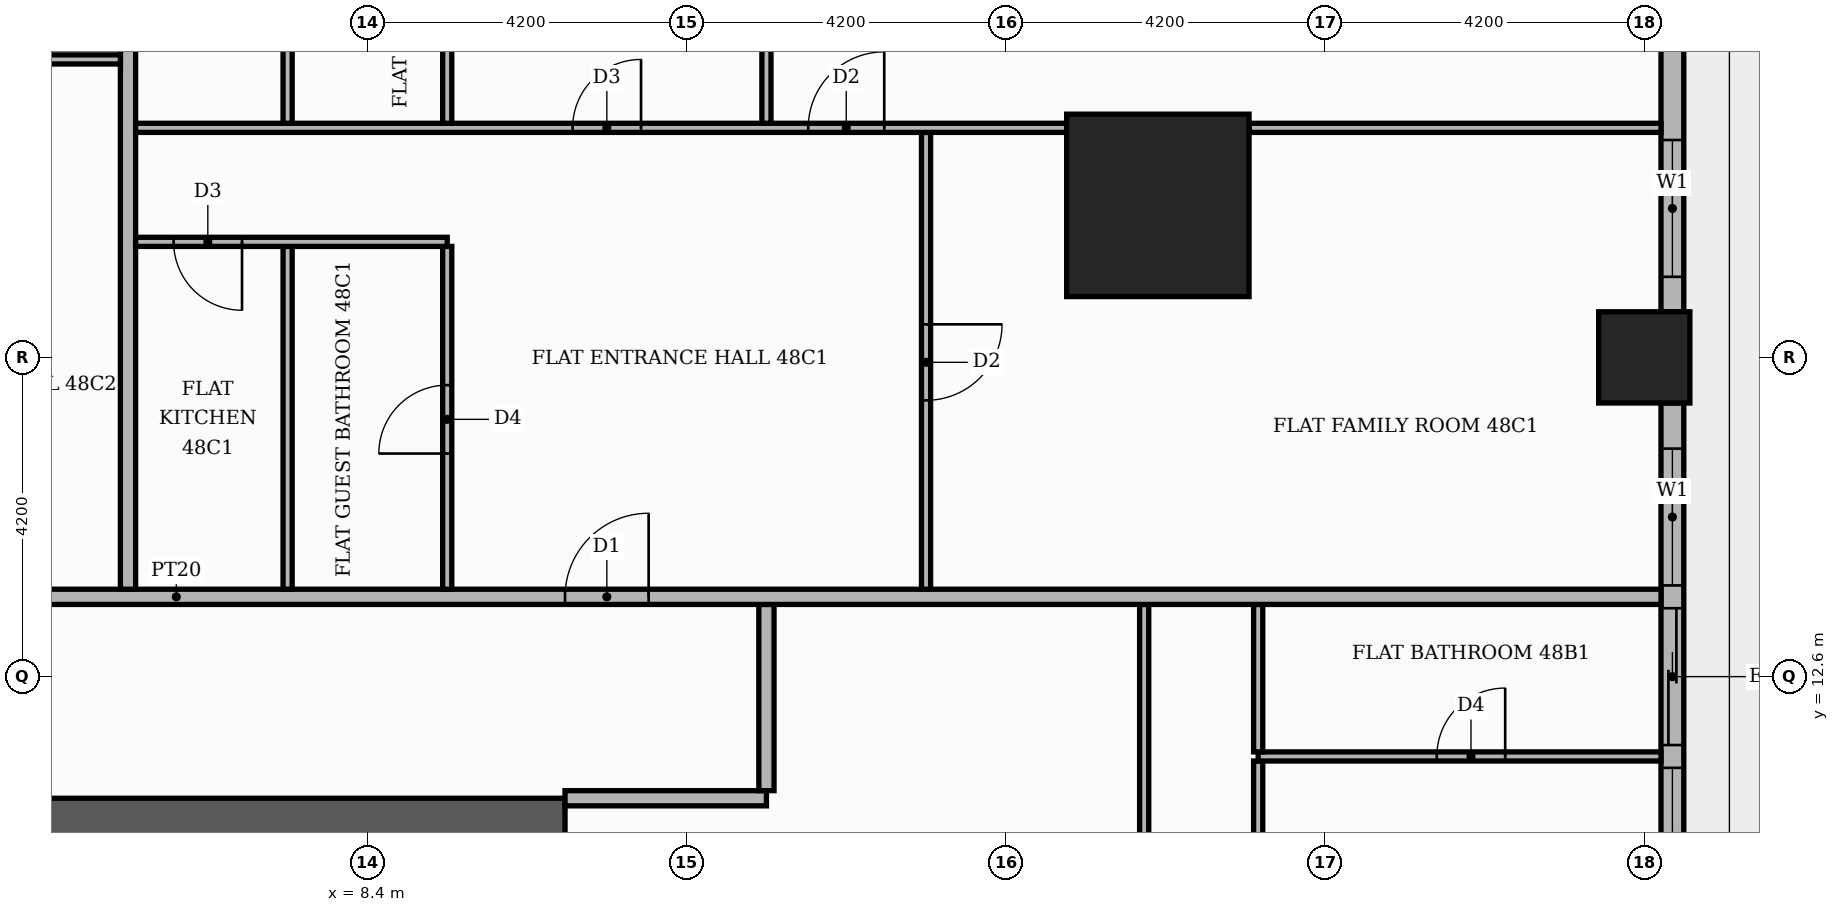
"""IFC4 building model, lengths in metres.
Left out: names, types, materials, properties, quantities, classifications, styles, units other than length and angle.
Written with IfcOpenShell. Run it as: python <this file> out.ifc"""

import sys

from ifc_helpers import new_model, si_unit, direction, frame, frame_2d, origin, origin_2d, place, context, subcontext, project, spatial, rectangle, extrude, element, fill, save


model = new_model("IFC4")
c1 = context("Model", 3, precision=1e-05, world=origin(), true_north=direction((0.0, 1.0)))
c2 = subcontext(c1, "Body", "Model", "MODEL_VIEW")
j1 = project(units=[si_unit("LENGTHUNIT", "METRE"), si_unit("PLANEANGLEUNIT", "RADIAN")], contexts=[c1])
p1 = place(None, origin())
s1 = spatial("IfcSite", under=j1, at=p1, CompositionType="ELEMENT")
p2 = place(p1, origin())
s2 = spatial("IfcBuilding", under=s1, at=p2, CompositionType="ELEMENT")
p3 = place(p2, frame((0.0, 0.0, 204.0)))
s3 = spatial("IfcBuildingStorey", under=s2, at=p3, CompositionType="ELEMENT", Elevation=204.0)
p4 = place(p3, frame((-11.0, 10.55, 0.0), z_axis=(0.0, 0.0, 1.0), x_axis=(1.0, 0.0, 0.0)))
e1 = element("IfcWall", 1, at=p4, inside=s3, PredefinedType="SHEAR", context=c2, shape_type="SweptSolid", body=[
    extrude(rectangle(XDim=22.0, YDim=0.9, at=frame_2d((11.0, 0.0))), origin(), (0.0, 0.0, 1.0), 3.48),
])
p5 = place(p4, frame((13.3, 0.0, 0.0)))
e2 = element("IfcOpeningElement", 2, at=p5, cuts=e1, PredefinedType="OPENING", context=c2, shape_type="SweptSolid", body=[
    extrude(rectangle(XDim=1.8, YDim=2.2, at=frame_2d((0.9, 1.1))), frame((0.0, 0.46, 0.0), z_axis=(0.0, -1.0, 0.0), x_axis=(1.0, 0.0, 0.0)), (0.0, 0.0, 1.0), 0.92),
])
p6 = place(p3, frame((18.8, 18.8, 0.0), z_axis=(0.0, 0.0, 1.0), x_axis=(1.0, 0.0, 0.0)))
e3 = element("IfcColumn", 3, at=p6, inside=s3, PredefinedType="COLUMN", context=c2, shape_type="SweptSolid", body=[
    extrude(rectangle(XDim=2.4, YDim=2.4, at=origin_2d()), origin(), (0.0, 0.0, 1.0), 3.9),
])
p7 = place(p3, frame((25.2, 16.8, 0.0), z_axis=(0.0, 0.0, 1.0), x_axis=(1.0, 0.0, 0.0)))
e4 = element("IfcColumn", 4, at=p7, inside=s3, PredefinedType="COLUMN", context=c2, shape_type="SweptSolid", body=[
    extrude(rectangle(XDim=1.2, YDim=1.2, at=origin_2d()), origin(), (0.0, 0.0, 1.0), 3.9),
])
p8 = place(p3, frame((25.57, 9.0, 0.0), z_axis=(0.0, 0.0, 1.0), x_axis=(0.0, 1.0, 0.0)))
e5 = element("IfcWall", 5, at=p8, inside=s3, PredefinedType="STANDARD", context=c2, shape_type="SweptSolid", body=[
    extrude(rectangle(XDim=7.2, YDim=0.3, at=frame_2d((3.6, 0.0))), origin(), (0.0, 0.0, 1.0), 3.48),
])
p9 = place(p8, frame((0.6, 0.0, 0.9)))
e6 = element("IfcOpeningElement", 6, at=p9, cuts=e5, PredefinedType="OPENING", context=c2, shape_type="SweptSolid", body=[
    extrude(rectangle(XDim=1.8, YDim=2.1, at=frame_2d((0.9, 1.05))), frame((0.0, 0.16, 0.0), z_axis=(0.0, -1.0, 0.0), x_axis=(1.0, 0.0, 0.0)), (0.0, 0.0, 1.0), 0.32),
])
p10 = place(p8, frame((2.7, 0.0, 0.0)))
e7 = element("IfcOpeningElement", 7, at=p10, cuts=e5, PredefinedType="OPENING", context=c2, shape_type="SweptSolid", body=[
    extrude(rectangle(XDim=1.8, YDim=2.4, at=frame_2d((0.9, 1.2))), frame((0.0, 0.16, 0.0), z_axis=(0.0, -1.0, 0.0), x_axis=(1.0, 0.0, 0.0)), (0.0, 0.0, 1.0), 0.32),
])
p11 = place(p8, frame((4.8, 0.0, 0.9)))
e8 = element("IfcOpeningElement", 8, at=p11, cuts=e5, PredefinedType="OPENING", context=c2, shape_type="SweptSolid", body=[
    extrude(rectangle(XDim=1.8, YDim=2.1, at=frame_2d((0.9, 1.05))), frame((0.0, 0.16, 0.0), z_axis=(0.0, -1.0, 0.0), x_axis=(1.0, 0.0, 0.0)), (0.0, 0.0, 1.0), 0.32),
])
p12 = place(p3, frame((25.57, 17.4, 0.0), z_axis=(0.0, 0.0, 1.0), x_axis=(0.0, 1.0, 0.0)))
e9 = element("IfcWall", 9, at=p12, inside=s3, PredefinedType="STANDARD", context=c2, shape_type="SweptSolid", body=[
    extrude(rectangle(XDim=3.82, YDim=0.3, at=frame_2d((1.91, 0.0))), origin(), (0.0, 0.0, 1.0), 3.48),
])
p13 = place(p12, frame((0.46, 0.0, 0.9)))
e10 = element("IfcOpeningElement", 10, at=p13, cuts=e9, PredefinedType="OPENING", context=c2, shape_type="SweptSolid", body=[
    extrude(rectangle(XDim=1.8, YDim=2.1, at=frame_2d((0.9, 1.05))), frame((0.0, 0.16, 0.0), z_axis=(0.0, -1.0, 0.0), x_axis=(1.0, 0.0, 0.0)), (0.0, 0.0, 1.0), 0.32),
])
p14 = place(p3, frame((18.62, 5.46, 0.0), z_axis=(0.0, 0.0, 1.0), x_axis=(0.0, 1.0, 0.0)))
e11 = element("IfcWall", 11, at=p14, inside=s3, PredefinedType="PARTITIONING", context=c2, shape_type="SweptSolid", body=[
    extrude(rectangle(XDim=8.09, YDim=0.12, at=frame_2d((4.045, 0.0))), origin(), (0.0, 0.0, 1.0), 3.48),
])
p15 = place(p14, frame((3.615, 0.0, 0.0)))
e12 = element("IfcOpeningElement", 12, at=p15, cuts=e11, PredefinedType="OPENING", context=c2, shape_type="SweptSolid", body=[
    extrude(rectangle(XDim=0.9, YDim=2.1, at=frame_2d((0.45, 1.05))), frame((0.0, 0.07, 0.0), z_axis=(0.0, -1.0, 0.0), x_axis=(1.0, 0.0, 0.0)), (0.0, 0.0, 1.0), 0.14),
])
p16 = place(p3, frame((20.12, 7.41, 0.0), z_axis=(0.0, 0.0, 1.0), x_axis=(0.0, 1.0, 0.0)))
e13 = element("IfcWall", 13, at=p16, inside=s3, PredefinedType="PARTITIONING", context=c2, shape_type="SweptSolid", body=[
    extrude(rectangle(XDim=4.08, YDim=0.12, at=frame_2d((2.04, 0.0))), origin(), (0.0, 0.0, 1.0), 3.48),
])
p17 = place(p16, frame((1.59, 0.0, 0.0)))
e14 = element("IfcOpeningElement", 14, at=p17, cuts=e13, PredefinedType="OPENING", context=c2, shape_type="SweptSolid", body=[
    extrude(rectangle(XDim=0.9, YDim=2.1, at=frame_2d((0.45, 1.05))), frame((0.0, 0.07, 0.0), z_axis=(0.0, -1.0, 0.0), x_axis=(1.0, 0.0, 0.0)), (0.0, 0.0, 1.0), 0.14),
])
p18 = place(p3, frame((11.0, 11.0, 0.0), z_axis=(0.0, 0.0, 1.0), x_axis=(1.0, 0.0, 0.0)))
e15 = element("IfcWall", 15, at=p18, inside=s3, PredefinedType="PARTITIONING", context=c2, shape_type="SweptSolid", body=[
    extrude(rectangle(XDim=2.65, YDim=0.2, at=frame_2d((1.325, 0.0))), origin(), (0.0, 0.0, 1.0), 3.48),
])
p19 = place(p3, frame((13.65, 11.1, 0.0), z_axis=(0.0, 0.0, 1.0), x_axis=(0.0, 1.0, 0.0)))
e16 = element("IfcWall", 16, at=p19, inside=s3, PredefinedType="PARTITIONING", context=c2, shape_type="SweptSolid", body=[
    extrude(rectangle(XDim=2.45, YDim=0.2, at=frame_2d((1.225, 0.0))), origin(), (0.0, 0.0, 1.0), 3.48),
])
p20 = place(p3, frame((20.12, 11.55, 0.0), z_axis=(0.0, 0.0, 1.0), x_axis=(1.0, 0.0, 0.0)))
e17 = element("IfcWall", 17, at=p20, inside=s3, PredefinedType="PARTITIONING", context=c2, shape_type="SweptSolid", body=[
    extrude(rectangle(XDim=5.3, YDim=0.12, at=frame_2d((2.65, 0.0))), origin(), (0.0, 0.0, 1.0), 3.48),
])
p21 = place(p20, frame((2.35, 0.0, 0.0)))
e18 = element("IfcOpeningElement", 18, at=p21, cuts=e17, PredefinedType="OPENING", context=c2, shape_type="SweptSolid", body=[
    extrude(rectangle(XDim=0.9, YDim=2.1, at=frame_2d((0.45, 1.05))), frame((0.0, 0.07, 0.0), z_axis=(0.0, -1.0, 0.0), x_axis=(1.0, 0.0, 0.0)), (0.0, 0.0, 1.0), 0.14),
])
p22 = place(p3, frame((20.12, 11.61, 0.0), z_axis=(0.0, 0.0, 1.0), x_axis=(0.0, 1.0, 0.0)))
e19 = element("IfcWall", 19, at=p22, inside=s3, PredefinedType="PARTITIONING", context=c2, shape_type="SweptSolid", body=[
    extrude(rectangle(XDim=1.94, YDim=0.12, at=frame_2d((0.97, 0.0))), origin(), (0.0, 0.0, 1.0), 3.48),
])
p23 = place(p3, frame((-13.65, 13.65, 0.0), z_axis=(0.0, 0.0, 1.0), x_axis=(1.0, 0.0, 0.0)))
e20 = element("IfcWall", 20, at=p23, inside=s3, PredefinedType="PARTITIONING", context=c2, shape_type="SweptSolid", body=[
    extrude(rectangle(XDim=39.07, YDim=0.2, at=frame_2d((19.535, 0.0))), origin(), (0.0, 0.0, 1.0), 3.48),
])
p24 = place(p23, frame((24.65, 0.0, 0.0)))
e21 = element("IfcOpeningElement", 21, at=p24, cuts=e20, PredefinedType="OPENING", context=c2, shape_type="SweptSolid", body=[
    extrude(rectangle(XDim=1.1, YDim=2.4, at=frame_2d((0.55, 1.2))), frame((0.0, 0.11, 0.0), z_axis=(0.0, -1.0, 0.0), x_axis=(1.0, 0.0, 0.0)), (0.0, 0.0, 1.0), 0.22),
])
p25 = place(p23, frame((16.25, 0.0, 0.0)))
e22 = element("IfcOpeningElement", 22, at=p25, cuts=e20, PredefinedType="OPENING", context=c2, shape_type="SweptSolid", body=[
    extrude(rectangle(XDim=1.1, YDim=2.4, at=frame_2d((0.55, 1.2))), frame((0.0, 0.11, 0.0), z_axis=(0.0, -1.0, 0.0), x_axis=(1.0, 0.0, 0.0)), (0.0, 0.0, 1.0), 0.22),
])
p26 = place(p3, frame((5.25, 13.75, 0.0), z_axis=(0.0, 0.0, 1.0), x_axis=(0.0, 1.0, 0.0)))
e23 = element("IfcWall", 23, at=p26, inside=s3, PredefinedType="PARTITIONING", context=c2, shape_type="SweptSolid", body=[
    extrude(rectangle(XDim=11.67, YDim=0.2, at=frame_2d((5.835, 0.0))), origin(), (0.0, 0.0, 1.0), 3.48),
])
p27 = place(p3, frame((7.35, 13.75, 0.0), z_axis=(0.0, 0.0, 1.0), x_axis=(0.0, 1.0, 0.0)))
e24 = element("IfcWall", 24, at=p27, inside=s3, PredefinedType="PARTITIONING", context=c2, shape_type="SweptSolid", body=[
    extrude(rectangle(XDim=4.51, YDim=0.12, at=frame_2d((2.255, 0.0))), origin(), (0.0, 0.0, 1.0), 3.48),
])
p28 = place(p3, frame((9.45, 13.75, 0.0), z_axis=(0.0, 0.0, 1.0), x_axis=(0.0, 1.0, 0.0)))
e25 = element("IfcWall", 25, at=p28, inside=s3, PredefinedType="PARTITIONING", context=c2, shape_type="SweptSolid", body=[
    extrude(rectangle(XDim=4.51, YDim=0.12, at=frame_2d((2.255, 0.0))), origin(), (0.0, 0.0, 1.0), 3.48),
])
p29 = place(p28, frame((1.785, 0.0, 0.0)))
e26 = element("IfcOpeningElement", 26, at=p29, cuts=e25, PredefinedType="OPENING", context=c2, shape_type="SweptSolid", body=[
    extrude(rectangle(XDim=0.9, YDim=2.1, at=frame_2d((0.45, 1.05))), frame((0.0, 0.07, 0.0), z_axis=(0.0, -1.0, 0.0), x_axis=(1.0, 0.0, 0.0)), (0.0, 0.0, 1.0), 0.14),
])
p30 = place(p3, frame((15.75, 13.75, 0.0), z_axis=(0.0, 0.0, 1.0), x_axis=(0.0, 1.0, 0.0)))
e27 = element("IfcWall", 27, at=p30, inside=s3, PredefinedType="PARTITIONING", context=c2, shape_type="SweptSolid", body=[
    extrude(rectangle(XDim=6.01, YDim=0.12, at=frame_2d((3.005, 0.0))), origin(), (0.0, 0.0, 1.0), 3.48),
])
p31 = place(p30, frame((2.485, 0.0, 0.0)))
e28 = element("IfcOpeningElement", 28, at=p31, cuts=e27, PredefinedType="OPENING", context=c2, shape_type="SweptSolid", body=[
    extrude(rectangle(XDim=1.0, YDim=2.1, at=frame_2d((0.5, 1.05))), frame((0.0, 0.07, 0.0), z_axis=(0.0, -1.0, 0.0), x_axis=(1.0, 0.0, 0.0)), (0.0, 0.0, 1.0), 0.14),
])
p32 = place(p3, frame((5.35, 18.32, 0.0), z_axis=(0.0, 0.0, 1.0), x_axis=(1.0, 0.0, 0.0)))
e29 = element("IfcWall", 29, at=p32, inside=s3, PredefinedType="PARTITIONING", context=c2, shape_type="SweptSolid", body=[
    extrude(rectangle(XDim=4.1, YDim=0.12, at=frame_2d((2.05, 0.0))), origin(), (0.0, 0.0, 1.0), 3.48),
])
p33 = place(p32, frame((0.5, 0.0, 0.0)))
e30 = element("IfcOpeningElement", 30, at=p33, cuts=e29, PredefinedType="OPENING", context=c2, shape_type="SweptSolid", body=[
    extrude(rectangle(XDim=0.9, YDim=2.1, at=frame_2d((0.45, 1.05))), frame((0.0, 0.07, 0.0), z_axis=(0.0, -1.0, 0.0), x_axis=(1.0, 0.0, 0.0)), (0.0, 0.0, 1.0), 0.14),
])
p34 = place(p3, frame((5.35, 19.82, 0.0), z_axis=(0.0, 0.0, 1.0), x_axis=(1.0, 0.0, 0.0)))
e31 = element("IfcWall", 31, at=p34, inside=s3, PredefinedType="PARTITIONING", context=c2, shape_type="SweptSolid", body=[
    extrude(rectangle(XDim=12.25, YDim=0.12, at=frame_2d((6.125, 0.0))), origin(), (0.0, 0.0, 1.0), 3.48),
])
p35 = place(p34, frame((8.85, 0.0, 0.0)))
e32 = element("IfcOpeningElement", 32, at=p35, cuts=e31, PredefinedType="OPENING", context=c2, shape_type="SweptSolid", body=[
    extrude(rectangle(XDim=1.0, YDim=2.1, at=frame_2d((0.5, 1.05))), frame((0.0, 0.07, 0.0), z_axis=(0.0, -1.0, 0.0), x_axis=(1.0, 0.0, 0.0)), (0.0, 0.0, 1.0), 0.14),
])
p36 = place(p34, frame((5.75, 0.0, 0.0)))
e33 = element("IfcOpeningElement", 33, at=p36, cuts=e31, PredefinedType="OPENING", context=c2, shape_type="SweptSolid", body=[
    extrude(rectangle(XDim=0.9, YDim=2.1, at=frame_2d((0.45, 1.05))), frame((0.0, 0.07, 0.0), z_axis=(0.0, -1.0, 0.0), x_axis=(1.0, 0.0, 0.0)), (0.0, 0.0, 1.0), 0.14),
])
p37 = place(p3, frame((20.0, 19.82, 0.0), z_axis=(0.0, 0.0, 1.0), x_axis=(1.0, 0.0, 0.0)))
e34 = element("IfcWall", 34, at=p37, inside=s3, PredefinedType="PARTITIONING", context=c2, shape_type="SweptSolid", body=[
    extrude(rectangle(XDim=5.42, YDim=0.12, at=frame_2d((2.71, 0.0))), origin(), (0.0, 0.0, 1.0), 3.48),
])
p38 = place(p3, frame((7.35, 19.88, 0.0), z_axis=(0.0, 0.0, 1.0), x_axis=(0.0, 1.0, 0.0)))
e35 = element("IfcWall", 35, at=p38, inside=s3, PredefinedType="PARTITIONING", context=c2, shape_type="SweptSolid", body=[
    extrude(rectangle(XDim=5.54, YDim=0.12, at=frame_2d((2.77, 0.0))), origin(), (0.0, 0.0, 1.0), 3.48),
])
p39 = place(p38, frame((2.44, 0.0, 0.0)))
e36 = element("IfcOpeningElement", 36, at=p39, cuts=e35, PredefinedType="OPENING", context=c2, shape_type="SweptSolid", body=[
    extrude(rectangle(XDim=0.9, YDim=2.1, at=frame_2d((0.45, 1.05))), frame((0.0, 0.07, 0.0), z_axis=(0.0, -1.0, 0.0), x_axis=(1.0, 0.0, 0.0)), (0.0, 0.0, 1.0), 0.14),
])
p40 = place(p3, frame((9.45, 19.88, 0.0), z_axis=(0.0, 0.0, 1.0), x_axis=(0.0, 1.0, 0.0)))
e37 = element("IfcWall", 37, at=p40, inside=s3, PredefinedType="PARTITIONING", context=c2, shape_type="SweptSolid", body=[
    extrude(rectangle(XDim=5.54, YDim=0.12, at=frame_2d((2.77, 0.0))), origin(), (0.0, 0.0, 1.0), 3.48),
])
p41 = place(p40, frame((2.44, 0.0, 0.0)))
e38 = element("IfcOpeningElement", 38, at=p41, cuts=e37, PredefinedType="OPENING", context=c2, shape_type="SweptSolid", body=[
    extrude(rectangle(XDim=0.9, YDim=2.1, at=frame_2d((0.45, 1.05))), frame((0.0, 0.07, 0.0), z_axis=(0.0, -1.0, 0.0), x_axis=(1.0, 0.0, 0.0)), (0.0, 0.0, 1.0), 0.14),
])
p42 = place(p3, frame((13.65, 19.88, 0.0), z_axis=(0.0, 0.0, 1.0), x_axis=(0.0, 1.0, 0.0)))
e39 = element("IfcWall", 39, at=p42, inside=s3, PredefinedType="PARTITIONING", context=c2, shape_type="SweptSolid", body=[
    extrude(rectangle(XDim=5.54, YDim=0.12, at=frame_2d((2.77, 0.0))), origin(), (0.0, 0.0, 1.0), 3.48),
])
p43 = place(p3, frame((-13.55, 20.72, 0.0), z_axis=(0.0, 0.0, 1.0), x_axis=(1.0, 0.0, 0.0)))
e40 = element("IfcWall", 40, at=p43, inside=s3, PredefinedType="PARTITIONING", context=c2, shape_type="SweptSolid", body=[
    extrude(rectangle(XDim=18.7, YDim=0.12, at=frame_2d((9.35, 0.0))), origin(), (0.0, 0.0, 1.0), 3.48),
])
p44 = place(p43, frame((16.2, 0.0, 0.0)))
e41 = element("IfcOpeningElement", 41, at=p44, cuts=e40, PredefinedType="OPENING", context=c2, shape_type="SweptSolid", body=[
    extrude(rectangle(XDim=1.0, YDim=2.1, at=frame_2d((0.5, 1.05))), frame((0.0, 0.07, 0.0), z_axis=(0.0, -1.0, 0.0), x_axis=(1.0, 0.0, 0.0)), (0.0, 0.0, 1.0), 0.14),
])
p45 = place(p43, frame((12.05, 0.0, 0.0)))
e42 = element("IfcOpeningElement", 42, at=p45, cuts=e40, PredefinedType="OPENING", context=c2, shape_type="SweptSolid", body=[
    extrude(rectangle(XDim=0.9, YDim=2.1, at=frame_2d((0.45, 1.05))), frame((0.0, 0.07, 0.0), z_axis=(0.0, -1.0, 0.0), x_axis=(1.0, 0.0, 0.0)), (0.0, 0.0, 1.0), 0.14),
])
p46 = place(p43, frame((5.75, 0.0, 0.0)))
e43 = element("IfcOpeningElement", 43, at=p46, cuts=e40, PredefinedType="OPENING", context=c2, shape_type="SweptSolid", body=[
    extrude(rectangle(XDim=0.9, YDim=2.1, at=frame_2d((0.45, 1.05))), frame((0.0, 0.07, 0.0), z_axis=(0.0, -1.0, 0.0), x_axis=(1.0, 0.0, 0.0)), (0.0, 0.0, 1.0), 0.14),
])
p47 = place(p9, origin())
e44 = element("IfcWindow", 44, at=p47, inside=s3, PartitioningType="SINGLE_PANEL", PredefinedType="WINDOW", context=c2, shape_type="SweptSolid", body=[
    extrude(rectangle(XDim=1.8, YDim=2.1, at=frame_2d((0.9, 1.05))), frame((0.0, 0.03, 0.0), z_axis=(0.0, -1.0, 0.0), x_axis=(1.0, 0.0, 0.0)), (0.0, 0.0, 1.0), 0.06),
])
fill(e6, e44)
p48 = place(p10, origin())
e45 = element("IfcDoor", 45, at=p48, inside=s3, OperationType="SLIDING_TO_RIGHT", PredefinedType="DOOR", context=c2, shape_type="SweptSolid", body=[
    extrude(rectangle(XDim=1.8, YDim=2.4, at=frame_2d((0.9, 1.2))), frame((0.0, 0.025, 0.0), z_axis=(0.0, -1.0, 0.0), x_axis=(1.0, 0.0, 0.0)), (0.0, 0.0, 1.0), 0.05),
])
fill(e7, e45)
p49 = place(p11, origin())
e46 = element("IfcWindow", 46, at=p49, inside=s3, PartitioningType="SINGLE_PANEL", PredefinedType="WINDOW", context=c2, shape_type="SweptSolid", body=[
    extrude(rectangle(XDim=1.8, YDim=2.1, at=frame_2d((0.9, 1.05))), frame((0.0, 0.03, 0.0), z_axis=(0.0, -1.0, 0.0), x_axis=(1.0, 0.0, 0.0)), (0.0, 0.0, 1.0), 0.06),
])
fill(e8, e46)
p50 = place(p13, origin())
e47 = element("IfcWindow", 47, at=p50, inside=s3, PartitioningType="SINGLE_PANEL", PredefinedType="WINDOW", context=c2, shape_type="SweptSolid", body=[
    extrude(rectangle(XDim=1.8, YDim=2.1, at=frame_2d((0.9, 1.05))), frame((0.0, 0.03, 0.0), z_axis=(0.0, -1.0, 0.0), x_axis=(1.0, 0.0, 0.0)), (0.0, 0.0, 1.0), 0.06),
])
fill(e10, e47)
p51 = place(p21, origin())
e48 = element("IfcDoor", 48, at=p51, inside=s3, OperationType="SINGLE_SWING_RIGHT", PredefinedType="DOOR", context=c2, shape_type="SweptSolid", body=[
    extrude(rectangle(XDim=0.9, YDim=2.1, at=frame_2d((0.45, 1.05))), frame((0.0, 0.025, 0.0), z_axis=(0.0, -1.0, 0.0), x_axis=(1.0, 0.0, 0.0)), (0.0, 0.0, 1.0), 0.05),
])
fill(e18, e48)
p52 = place(p24, origin())
e49 = element("IfcDoor", 49, at=p52, inside=s3, OperationType="SINGLE_SWING_RIGHT", PredefinedType="DOOR", context=c2, shape_type="SweptSolid", body=[
    extrude(rectangle(XDim=1.1, YDim=2.4, at=frame_2d((0.55, 1.2))), frame((0.0, 0.025, 0.0), z_axis=(0.0, -1.0, 0.0), x_axis=(1.0, 0.0, 0.0)), (0.0, 0.0, 1.0), 0.05),
])
fill(e21, e49)
p53 = place(p31, frame((1.0, 0.0, 0.0), z_axis=(0.0, 0.0, 1.0), x_axis=(-1.0, 0.0, 0.0)))
e50 = element("IfcDoor", 50, at=p53, inside=s3, OperationType="SINGLE_SWING_RIGHT", PredefinedType="DOOR", context=c2, shape_type="SweptSolid", body=[
    extrude(rectangle(XDim=1.0, YDim=2.1, at=frame_2d((0.5, 1.05))), frame((0.0, 0.025, 0.0), z_axis=(0.0, -1.0, 0.0), x_axis=(1.0, 0.0, 0.0)), (0.0, 0.0, 1.0), 0.05),
])
fill(e28, e50)
p54 = place(p29, origin())
e51 = element("IfcDoor", 51, at=p54, inside=s3, OperationType="SINGLE_SWING_LEFT", PredefinedType="DOOR", context=c2, shape_type="SweptSolid", body=[
    extrude(rectangle(XDim=0.9, YDim=2.1, at=frame_2d((0.45, 1.05))), frame((0.0, 0.025, 0.0), z_axis=(0.0, -1.0, 0.0), x_axis=(1.0, 0.0, 0.0)), (0.0, 0.0, 1.0), 0.05),
])
fill(e26, e51)
p55 = place(p33, frame((0.9, 0.0, 0.0), z_axis=(0.0, 0.0, 1.0), x_axis=(-1.0, 0.0, 0.0)))
e52 = element("IfcDoor", 52, at=p55, inside=s3, OperationType="SINGLE_SWING_RIGHT", PredefinedType="DOOR", context=c2, shape_type="SweptSolid", body=[
    extrude(rectangle(XDim=0.9, YDim=2.1, at=frame_2d((0.45, 1.05))), frame((0.0, 0.025, 0.0), z_axis=(0.0, -1.0, 0.0), x_axis=(1.0, 0.0, 0.0)), (0.0, 0.0, 1.0), 0.05),
])
fill(e30, e52)
p56 = place(p35, origin())
e53 = element("IfcDoor", 53, at=p56, inside=s3, OperationType="SINGLE_SWING_RIGHT", PredefinedType="DOOR", context=c2, shape_type="SweptSolid", body=[
    extrude(rectangle(XDim=1.0, YDim=2.1, at=frame_2d((0.5, 1.05))), frame((0.0, 0.025, 0.0), z_axis=(0.0, -1.0, 0.0), x_axis=(1.0, 0.0, 0.0)), (0.0, 0.0, 1.0), 0.05),
])
fill(e32, e53)
p57 = place(p36, origin())
e54 = element("IfcDoor", 54, at=p57, inside=s3, OperationType="SINGLE_SWING_RIGHT", PredefinedType="DOOR", context=c2, shape_type="SweptSolid", body=[
    extrude(rectangle(XDim=0.9, YDim=2.1, at=frame_2d((0.45, 1.05))), frame((0.0, 0.025, 0.0), z_axis=(0.0, -1.0, 0.0), x_axis=(1.0, 0.0, 0.0)), (0.0, 0.0, 1.0), 0.05),
])
fill(e33, e54)
save(model, sys.argv[1])
